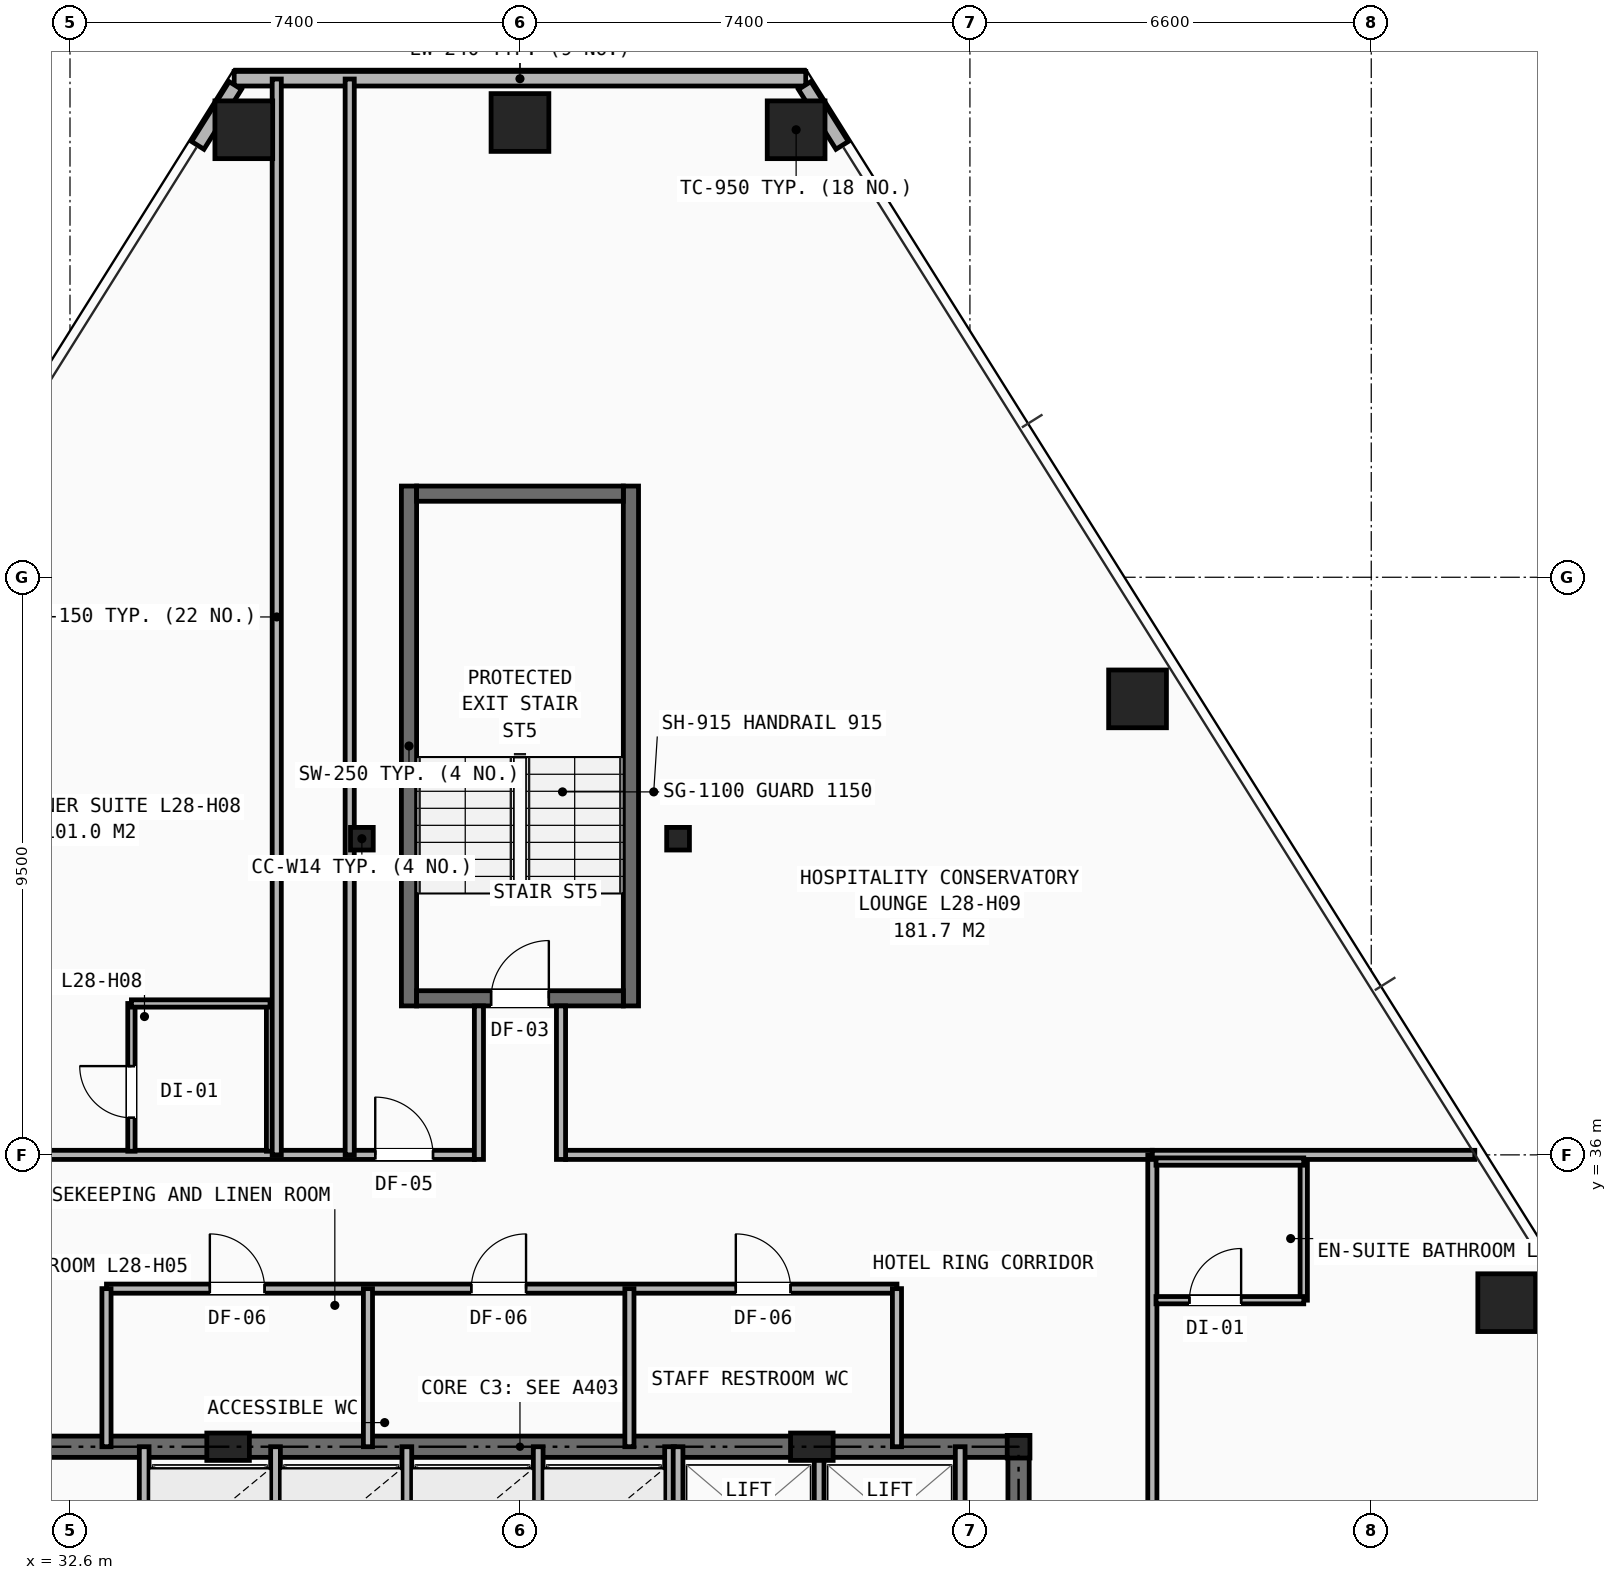
"""IFC4 building model, lengths in metres.
Left out: names, types, materials, properties, quantities, classifications, styles, units other than length and angle.
Written with IfcOpenShell. Run it as: python <this file> out.ifc"""

import sys

from ifc_helpers import new_model, si_unit, direction, frame, frame_2d, origin, origin_2d, place, context, subcontext, project, spatial, rectangle, hollow_rectangle, i_section, extrude, element, fill, save


model = new_model("IFC4")
c1 = context("Model", 3, precision=1e-05, world=origin(), true_north=direction((0.0, 1.0)))
c2 = subcontext(c1, "Body", "Model", "MODEL_VIEW")
j1 = project(units=[si_unit("LENGTHUNIT", "METRE"), si_unit("PLANEANGLEUNIT", "RADIAN")], contexts=[c1])
p1 = place(None, origin())
s1 = spatial("IfcSite", under=j1, at=p1, CompositionType="ELEMENT")
p2 = place(p1, origin())
s2 = spatial("IfcBuilding", under=s1, at=p2, CompositionType="ELEMENT")
p3 = place(p2, frame((0.0, 0.0, 99.0)))
s3 = spatial("IfcBuildingStorey", under=s2, at=p3, CompositionType="ELEMENT", Elevation=99.0)
for number, where, z_axis, x_axis in (
    (1, (48.2, 31.2, 0.0), (0.0, 0.0, 1.0), (1.0, 0.0, 0.0)),
    (2, (37.4, 41.2, 0.0), (0.0, 0.0, 1.0), (1.0, 0.0, 0.0)),
    (3, (42.6, 41.2, 0.0), (0.0, 0.0, 1.0), (1.0, 0.0, 0.0)),
):
    element("IfcColumn", number, at=place(p3, frame(where, z_axis=z_axis, x_axis=x_axis)), inside=s3, PredefinedType="COLUMN", context=c2, shape_type="SweptSolid", body=[
        extrude(i_section(OverallWidth=0.374, OverallDepth=0.372, WebThickness=0.016, FlangeThickness=0.026, at=origin_2d()), origin(), (0.0, 0.0, 1.0), 3.2),
    ])
for number, where, z_axis, x_axis in (
    (4, (35.2, 31.2, 0.0), (0.0, 0.0, 1.0), (1.0, 0.0, 0.0)),
    (5, (44.8, 31.2, 0.0), (0.0, 0.0, 1.0), (1.0, 0.0, 0.0)),
):
    element("IfcColumn", number, at=place(p3, frame(where, z_axis=z_axis, x_axis=x_axis)), inside=s3, PredefinedType="PILASTER", context=c2, shape_type="SweptSolid", body=[
        extrude(rectangle(XDim=0.7, YDim=0.45, at=origin_2d()), origin(), (0.0, 0.0, 1.0), 3.2),
    ])
for number, where, z_axis, x_axis in (
    (6, (44.542, 52.86, 0.0), (0.0, 0.0, 1.0), (1.0, 0.0, 0.0)),
    (7, (40.0, 52.979, 0.0), (0.0, 0.0, 1.0), (1.0, 0.0, 0.0)),
    (8, (35.458, 52.86, 0.0), (0.0, 0.0, 1.0), (1.0, 0.0, 0.0)),
    (9, (56.228, 33.569, 0.0), (0.0, 0.0, 1.0), (1.0, 0.0, 0.0)),
    (10, (50.156, 43.5, 0.0), (0.0, 0.0, 1.0), (1.0, 0.0, 0.0)),
):
    element("IfcColumn", number, at=place(p3, frame(where, z_axis=z_axis, x_axis=x_axis)), inside=s3, PredefinedType="COLUMN", context=c2, shape_type="SweptSolid", body=[
        extrude(hollow_rectangle(XDim=0.95, YDim=0.95, WallThickness=0.065, at=origin_2d()), origin(), (0.0, 0.0, 1.0), 3.2),
    ])
p4 = place(p3, frame((35.3, 53.699, 0.0), z_axis=(0.0, 0.0, 1.0), x_axis=(1.0, 0.0, 0.0)))
e11 = element("IfcWall", 11, at=p4, inside=s3, PredefinedType="SHEAR", context=c2, shape_type="SweptSolid", body=[
    extrude(rectangle(XDim=9.4, YDim=0.24, at=frame_2d((4.7, 0.0))), origin(), (0.0, 0.0, 1.0), 2.253),
])
for number, where, z_axis, x_axis in (
    (12, (35.319, 53.588, 0.0), (0.0, 0.0, 1.0), (-0.531, -0.847, 0.0)),
    (13, (45.299, 52.603, 0.0), (0.0, 0.0, 1.0), (-0.531, 0.847, 0.0)),
):
    element("IfcWall", number, at=place(p3, frame(where, z_axis=z_axis, x_axis=x_axis)), inside=s3, PredefinedType="SHEAR", context=c2, shape_type="SweptSolid", body=[
        extrude(rectangle(XDim=1.162, YDim=0.24, at=frame_2d((0.581, 0.0))), origin(), (0.0, 0.0, 1.0), 2.253),
    ])
p5 = place(p3, frame((31.8, 31.2, 0.0), z_axis=(0.0, 0.0, 1.0), x_axis=(1.0, 0.0, 0.0)))
e14 = element("IfcWall", 14, at=p5, inside=s3, PredefinedType="SHEAR", context=c2, shape_type="SweptSolid", body=[
    extrude(rectangle(XDim=16.4, YDim=0.35, at=frame_2d((8.2, 0.0))), origin(), (0.0, 0.0, 1.0), 2.97),
])
p6 = place(p3, frame((48.2, 16.4, 0.0), z_axis=(0.0, 0.0, 1.0), x_axis=(0.0, 1.0, 0.0)))
e15 = element("IfcWall", 15, at=p6, inside=s3, PredefinedType="SHEAR", context=c2, shape_type="SweptSolid", body=[
    extrude(rectangle(XDim=14.8, YDim=0.35, at=frame_2d((7.4, 0.0))), origin(), (0.0, 0.0, 1.0), 2.97),
])
p7 = place(p6, frame((11.0, 0.0, 0.0)))
e16 = element("IfcOpeningElement", 16, at=p7, cuts=e15, PredefinedType="OPENING", context=c2, shape_type="SweptSolid", body=[
    extrude(rectangle(XDim=1.1, YDim=2.15, at=frame_2d((0.55, 1.075))), frame((0.0, 0.185, 0.0), z_axis=(0.0, -1.0, 0.0), x_axis=(1.0, 0.0, 0.0)), (0.0, 0.0, 1.0), 0.37),
])
for number, where, z_axis, x_axis in (
    (17, (33.82, 29.02, 0.0), (0.0, 0.0, 1.0), (0.0, 1.0, 0.0)),
    (18, (35.98, 29.02, 0.0), (0.0, 0.0, 1.0), (0.0, 1.0, 0.0)),
    (19, (38.14, 29.02, 0.0), (0.0, 0.0, 1.0), (0.0, 1.0, 0.0)),
    (20, (40.3, 29.02, 0.0), (0.0, 0.0, 1.0), (0.0, 1.0, 0.0)),
    (21, (42.46, 29.02, 0.0), (0.0, 0.0, 1.0), (0.0, 1.0, 0.0)),
    (22, (42.6, 29.02, 0.0), (0.0, 0.0, 1.0), (0.0, 1.0, 0.0)),
    (23, (44.92, 29.02, 0.0), (0.0, 0.0, 1.0), (0.0, 1.0, 0.0)),
    (24, (47.24, 29.02, 0.0), (0.0, 0.0, 1.0), (0.0, 1.0, 0.0)),
):
    element("IfcWall", number, at=place(p3, frame(where, z_axis=z_axis, x_axis=x_axis)), inside=s3, PredefinedType="SOLIDWALL", context=c2, shape_type="SweptSolid", body=[
        extrude(rectangle(XDim=2.18, YDim=0.16, at=frame_2d((1.09, 0.0))), origin(), (0.0, 0.0, 1.0), 2.421),
    ])
p8 = place(p3, frame((33.2, 33.8, 0.0), z_axis=(0.0, 0.0, 1.0), x_axis=(1.0, 0.0, 0.0)))
e25 = element("IfcWall", 25, at=p8, inside=s3, PredefinedType="PARTITIONING", context=c2, shape_type="SweptSolid", body=[
    extrude(rectangle(XDim=13.0, YDim=0.15, at=frame_2d((6.5, 0.0))), origin(), (0.0, 0.0, 1.0), 2.97),
])
p9 = place(p8, frame((1.7, 0.0, 0.0)))
e26 = element("IfcOpeningElement", 26, at=p9, cuts=e25, PredefinedType="OPENING", context=c2, shape_type="SweptSolid", body=[
    extrude(rectangle(XDim=0.9, YDim=2.1, at=frame_2d((0.45, 1.05))), frame((0.0, 0.085, 0.0), z_axis=(0.0, -1.0, 0.0), x_axis=(1.0, 0.0, 0.0)), (0.0, 0.0, 1.0), 0.17),
])
p10 = place(p8, frame((6.0, 0.0, 0.0)))
e27 = element("IfcOpeningElement", 27, at=p10, cuts=e25, PredefinedType="OPENING", context=c2, shape_type="SweptSolid", body=[
    extrude(rectangle(XDim=0.9, YDim=2.1, at=frame_2d((0.45, 1.05))), frame((0.0, 0.085, 0.0), z_axis=(0.0, -1.0, 0.0), x_axis=(1.0, 0.0, 0.0)), (0.0, 0.0, 1.0), 0.17),
])
p11 = place(p8, frame((10.35, 0.0, 0.0)))
e28 = element("IfcOpeningElement", 28, at=p11, cuts=e25, PredefinedType="OPENING", context=c2, shape_type="SweptSolid", body=[
    extrude(rectangle(XDim=0.9, YDim=2.1, at=frame_2d((0.45, 1.05))), frame((0.0, 0.085, 0.0), z_axis=(0.0, -1.0, 0.0), x_axis=(1.0, 0.0, 0.0)), (0.0, 0.0, 1.0), 0.17),
])
for number, where, z_axis, x_axis in (
    (29, (33.2, 31.2, 0.0), (0.0, 0.0, 1.0), (0.0, 1.0, 0.0)),
    (30, (46.2, 31.2, 0.0), (0.0, 0.0, 1.0), (0.0, 1.0, 0.0)),
    (31, (37.5, 31.2, 0.0), (0.0, 0.0, 1.0), (0.0, 1.0, 0.0)),
    (32, (41.8, 31.2, 0.0), (0.0, 0.0, 1.0), (0.0, 1.0, 0.0)),
):
    element("IfcWall", number, at=place(p3, frame(where, z_axis=z_axis, x_axis=x_axis)), inside=s3, PredefinedType="PARTITIONING", context=c2, shape_type="SweptSolid", body=[
        extrude(rectangle(XDim=2.6, YDim=0.15, at=frame_2d((1.3, 0.0))), origin(), (0.0, 0.0, 1.0), 2.421),
    ])
p12 = place(p3, frame((29.6, 36.0, 0.0), z_axis=(0.0, 0.0, 1.0), x_axis=(1.0, 0.0, 0.0)))
e33 = element("IfcWall", 33, at=p12, inside=s3, PredefinedType="PARTITIONING", context=c2, shape_type="SweptSolid", body=[
    extrude(rectangle(XDim=9.65, YDim=0.15, at=frame_2d((4.825, 0.0))), origin(), (0.0, 0.0, 1.0), 2.503),
])
p13 = place(p12, frame((0.57, 0.0, 0.0)))
e34 = element("IfcOpeningElement", 34, at=p13, cuts=e33, PredefinedType="OPENING", context=c2, shape_type="SweptSolid", body=[
    extrude(rectangle(XDim=0.95, YDim=2.1, at=frame_2d((0.475, 1.05))), frame((0.0, 0.085, 0.0), z_axis=(0.0, -1.0, 0.0), x_axis=(1.0, 0.0, 0.0)), (0.0, 0.0, 1.0), 0.17),
])
p14 = place(p12, frame((8.02, 0.0, 0.0)))
e35 = element("IfcOpeningElement", 35, at=p14, cuts=e33, PredefinedType="OPENING", context=c2, shape_type="SweptSolid", body=[
    extrude(rectangle(XDim=0.95, YDim=2.1, at=frame_2d((0.475, 1.05))), frame((0.0, 0.085, 0.0), z_axis=(0.0, -1.0, 0.0), x_axis=(1.0, 0.0, 0.0)), (0.0, 0.0, 1.0), 0.17),
])
p15 = place(p3, frame((40.75, 36.0, 0.0), z_axis=(0.0, 0.0, 1.0), x_axis=(1.0, 0.0, 0.0)))
e36 = element("IfcWall", 36, at=p15, inside=s3, PredefinedType="PARTITIONING", context=c2, shape_type="SweptSolid", body=[
    extrude(rectangle(XDim=9.65, YDim=0.15, at=frame_2d((4.825, 0.0))), origin(), (0.0, 0.0, 1.0), 2.503),
])
p16 = place(p3, frame((50.4, 14.1, 0.0), z_axis=(0.0, 0.0, 1.0), x_axis=(0.0, 1.0, 0.0)))
e37 = element("IfcWall", 37, at=p16, inside=s3, PredefinedType="PARTITIONING", context=c2, shape_type="SweptSolid", body=[
    extrude(rectangle(XDim=21.9, YDim=0.15, at=frame_2d((10.95, 0.0))), origin(), (0.0, 0.0, 1.0), 2.181),
])
p17 = place(p16, frame((0.42, 0.0, 0.0)))
e38 = element("IfcOpeningElement", 38, at=p17, cuts=e37, PredefinedType="OPENING", context=c2, shape_type="SweptSolid", body=[
    extrude(rectangle(XDim=0.95, YDim=2.1, at=frame_2d((0.475, 1.05))), frame((0.0, 0.085, 0.0), z_axis=(0.0, -1.0, 0.0), x_axis=(1.0, 0.0, 0.0)), (0.0, 0.0, 1.0), 0.17),
])
p18 = place(p16, frame((10.82, 0.0, 0.0)))
e39 = element("IfcOpeningElement", 39, at=p18, cuts=e37, PredefinedType="OPENING", context=c2, shape_type="SweptSolid", body=[
    extrude(rectangle(XDim=0.95, YDim=2.1, at=frame_2d((0.475, 1.05))), frame((0.0, 0.085, 0.0), z_axis=(0.0, -1.0, 0.0), x_axis=(1.0, 0.0, 0.0)), (0.0, 0.0, 1.0), 0.17),
])
p19 = place(p3, frame((50.4, 36.0, 0.0), z_axis=(0.0, 0.0, 1.0), x_axis=(1.0, 0.0, 0.0)))
e40 = element("IfcWall", 40, at=p19, inside=s3, PredefinedType="PARTITIONING", context=c2, shape_type="SweptSolid", body=[
    extrude(rectangle(XDim=5.303, YDim=0.15, at=frame_2d((2.651, 0.0))), origin(), (0.0, 0.0, 1.0), 2.258),
])
p20 = place(p3, frame((52.89, 33.61, 0.0), z_axis=(0.0, 0.0, 1.0), x_axis=(0.0, 1.0, 0.0)))
e41 = element("IfcWall", 41, at=p20, inside=s3, PredefinedType="PARTITIONING", context=c2, shape_type="SweptSolid", body=[
    extrude(rectangle(XDim=2.28, YDim=0.12, at=frame_2d((1.14, 0.0))), origin(), (0.0, 0.0, 1.0), 2.97),
])
p21 = place(p3, frame((50.46, 33.61, 0.0), z_axis=(0.0, 0.0, 1.0), x_axis=(1.0, 0.0, 0.0)))
e42 = element("IfcWall", 42, at=p21, inside=s3, PredefinedType="PARTITIONING", context=c2, shape_type="SweptSolid", body=[
    extrude(rectangle(XDim=2.43, YDim=0.12, at=frame_2d((1.215, 0.0))), origin(), (0.0, 0.0, 1.0), 2.503),
])
p22 = place(p21, frame((0.55, 0.0, 0.0)))
e43 = element("IfcOpeningElement", 43, at=p22, cuts=e42, PredefinedType="OPENING", context=c2, shape_type="SweptSolid", body=[
    extrude(rectangle(XDim=0.85, YDim=2.05, at=frame_2d((0.425, 1.025))), frame((0.0, 0.07, 0.0), z_axis=(0.0, -1.0, 0.0), x_axis=(1.0, 0.0, 0.0)), (0.0, 0.0, 1.0), 0.14),
])
p23 = place(p3, frame((50.46, 35.89, 0.0), z_axis=(0.0, 0.0, 1.0), x_axis=(1.0, 0.0, 0.0)))
e44 = element("IfcWall", 44, at=p23, inside=s3, PredefinedType="PARTITIONING", context=c2, shape_type="SweptSolid", body=[
    extrude(rectangle(XDim=2.43, YDim=0.12, at=frame_2d((1.215, 0.0))), origin(), (0.0, 0.0, 1.0), 2.97),
])
p24 = place(p3, frame((33.61, 36.06, 0.0), z_axis=(0.0, 0.0, 1.0), x_axis=(0.0, 1.0, 0.0)))
e45 = element("IfcWall", 45, at=p24, inside=s3, PredefinedType="PARTITIONING", context=c2, shape_type="SweptSolid", body=[
    extrude(rectangle(XDim=2.43, YDim=0.12, at=frame_2d((1.215, 0.0))), origin(), (0.0, 0.0, 1.0), 2.97),
])
p25 = place(p24, frame((0.55, 0.0, 0.0)))
e46 = element("IfcOpeningElement", 46, at=p25, cuts=e45, PredefinedType="OPENING", context=c2, shape_type="SweptSolid", body=[
    extrude(rectangle(XDim=0.85, YDim=2.05, at=frame_2d((0.425, 1.025))), frame((0.0, 0.07, 0.0), z_axis=(0.0, -1.0, 0.0), x_axis=(1.0, 0.0, 0.0)), (0.0, 0.0, 1.0), 0.14),
])
p26 = place(p3, frame((35.89, 36.06, 0.0), z_axis=(0.0, 0.0, 1.0), x_axis=(0.0, 1.0, 0.0)))
e47 = element("IfcWall", 47, at=p26, inside=s3, PredefinedType="PARTITIONING", context=c2, shape_type="SweptSolid", body=[
    extrude(rectangle(XDim=2.43, YDim=0.12, at=frame_2d((1.215, 0.0))), origin(), (0.0, 0.0, 1.0), 2.97),
])
p27 = place(p3, frame((33.61, 38.49, 0.0), z_axis=(0.0, 0.0, 1.0), x_axis=(1.0, 0.0, 0.0)))
e48 = element("IfcWall", 48, at=p27, inside=s3, PredefinedType="PARTITIONING", context=c2, shape_type="SweptSolid", body=[
    extrude(rectangle(XDim=2.28, YDim=0.12, at=frame_2d((1.14, 0.0))), origin(), (0.0, 0.0, 1.0), 2.97),
])
for number, where, z_axis, x_axis in (
    (49, (36.0, 36.0, 0.0), (0.0, 0.0, 1.0), (0.0, 1.0, 0.0)),
    (50, (37.2, 36.0, 0.0), (0.0, 0.0, 1.0), (0.0, 1.0, 0.0)),
):
    element("IfcWall", number, at=place(p3, frame(where, z_axis=z_axis, x_axis=x_axis)), inside=s3, PredefinedType="PARTITIONING", context=c2, shape_type="SweptSolid", body=[
        extrude(rectangle(XDim=17.694, YDim=0.15, at=frame_2d((8.847, 0.0))), origin(), (0.0, 0.0, 1.0), 2.181),
    ])
for number, where, z_axis, x_axis in (
    (51, (38.175, 38.45, 0.0), (0.0, 0.0, 1.0), (0.0, 1.0, 0.0)),
    (52, (41.825, 38.45, 0.0), (0.0, 0.0, 1.0), (0.0, 1.0, 0.0)),
):
    element("IfcWall", number, at=place(p3, frame(where, z_axis=z_axis, x_axis=x_axis)), inside=s3, PredefinedType="SHEAR", context=c2, shape_type="SweptSolid", body=[
        extrude(rectangle(XDim=8.55, YDim=0.25, at=frame_2d((4.275, 0.0))), origin(), (0.0, 0.0, 1.0), 2.97),
    ])
p28 = place(p3, frame((38.3, 38.575, 0.0), z_axis=(0.0, 0.0, 1.0), x_axis=(1.0, 0.0, 0.0)))
e53 = element("IfcWall", 53, at=p28, inside=s3, PredefinedType="SHEAR", context=c2, shape_type="SweptSolid", body=[
    extrude(rectangle(XDim=3.4, YDim=0.25, at=frame_2d((1.7, 0.0))), origin(), (0.0, 0.0, 1.0), 2.97),
])
p29 = place(p28, frame((1.225, 0.0, 0.0)))
e54 = element("IfcOpeningElement", 54, at=p29, cuts=e53, PredefinedType="OPENING", context=c2, shape_type="SweptSolid", body=[
    extrude(rectangle(XDim=0.95, YDim=2.1, at=frame_2d((0.475, 1.05))), frame((0.0, 0.135, 0.0), z_axis=(0.0, -1.0, 0.0), x_axis=(1.0, 0.0, 0.0)), (0.0, 0.0, 1.0), 0.27),
])
p30 = place(p3, frame((38.3, 46.875, 0.0), z_axis=(0.0, 0.0, 1.0), x_axis=(1.0, 0.0, 0.0)))
e55 = element("IfcWall", 55, at=p30, inside=s3, PredefinedType="SHEAR", context=c2, shape_type="SweptSolid", body=[
    extrude(rectangle(XDim=3.4, YDim=0.25, at=frame_2d((1.7, 0.0))), origin(), (0.0, 0.0, 1.0), 2.97),
])
for number, where, z_axis, x_axis in (
    (56, (39.325, 35.925, 0.0), (0.0, 0.0, 1.0), (0.0, 1.0, 0.0)),
    (57, (40.675, 35.925, 0.0), (0.0, 0.0, 1.0), (0.0, 1.0, 0.0)),
):
    element("IfcWall", number, at=place(p3, frame(where, z_axis=z_axis, x_axis=x_axis)), inside=s3, PredefinedType="PARTITIONING", context=c2, shape_type="SweptSolid", body=[
        extrude(rectangle(XDim=2.525, YDim=0.15, at=frame_2d((1.262, 0.0))), origin(), (0.0, 0.0, 1.0), 2.97),
    ])
p31 = place(p9, origin())
e58 = element("IfcDoor", 58, at=p31, inside=s3, OperationType="SINGLE_SWING_LEFT", PredefinedType="DOOR", context=c2, shape_type="SweptSolid", body=[
    extrude(rectangle(XDim=0.9, YDim=2.1, at=frame_2d((0.45, 1.05))), frame((0.0, 0.025, 0.0), z_axis=(0.0, -1.0, 0.0), x_axis=(1.0, 0.0, 0.0)), (0.0, 0.0, 1.0), 0.05),
])
fill(e26, e58)
p32 = place(p10, origin())
e59 = element("IfcDoor", 59, at=p32, inside=s3, OperationType="SINGLE_SWING_RIGHT", PredefinedType="DOOR", context=c2, shape_type="SweptSolid", body=[
    extrude(rectangle(XDim=0.9, YDim=2.1, at=frame_2d((0.45, 1.05))), frame((0.0, 0.025, 0.0), z_axis=(0.0, -1.0, 0.0), x_axis=(1.0, 0.0, 0.0)), (0.0, 0.0, 1.0), 0.05),
])
fill(e27, e59)
p33 = place(p11, origin())
e60 = element("IfcDoor", 60, at=p33, inside=s3, OperationType="SINGLE_SWING_LEFT", PredefinedType="DOOR", context=c2, shape_type="SweptSolid", body=[
    extrude(rectangle(XDim=0.9, YDim=2.1, at=frame_2d((0.45, 1.05))), frame((0.0, 0.025, 0.0), z_axis=(0.0, -1.0, 0.0), x_axis=(1.0, 0.0, 0.0)), (0.0, 0.0, 1.0), 0.05),
])
fill(e28, e60)
p34 = place(p22, origin())
e61 = element("IfcDoor", 61, at=p34, inside=s3, OperationType="SINGLE_SWING_RIGHT", PredefinedType="DOOR", context=c2, shape_type="SweptSolid", body=[
    extrude(rectangle(XDim=0.85, YDim=2.05, at=frame_2d((0.425, 1.025))), frame((0.0, 0.025, 0.0), z_axis=(0.0, -1.0, 0.0), x_axis=(1.0, 0.0, 0.0)), (0.0, 0.0, 1.0), 0.05),
])
fill(e43, e61)
p35 = place(p25, origin())
e62 = element("IfcDoor", 62, at=p35, inside=s3, OperationType="SINGLE_SWING_RIGHT", PredefinedType="DOOR", context=c2, shape_type="SweptSolid", body=[
    extrude(rectangle(XDim=0.85, YDim=2.05, at=frame_2d((0.425, 1.025))), frame((0.0, 0.025, 0.0), z_axis=(0.0, -1.0, 0.0), x_axis=(1.0, 0.0, 0.0)), (0.0, 0.0, 1.0), 0.05),
])
fill(e46, e62)
p36 = place(p14, origin())
e63 = element("IfcDoor", 63, at=p36, inside=s3, OperationType="SINGLE_SWING_LEFT", PredefinedType="DOOR", context=c2, shape_type="SweptSolid", body=[
    extrude(rectangle(XDim=0.95, YDim=2.1, at=frame_2d((0.475, 1.05))), frame((0.0, 0.025, 0.0), z_axis=(0.0, -1.0, 0.0), x_axis=(1.0, 0.0, 0.0)), (0.0, 0.0, 1.0), 0.05),
])
fill(e35, e63)
p37 = place(p29, origin())
e64 = element("IfcDoor", 64, at=p37, inside=s3, OperationType="SINGLE_SWING_RIGHT", PredefinedType="DOOR", context=c2, shape_type="SweptSolid", body=[
    extrude(rectangle(XDim=0.95, YDim=2.1, at=frame_2d((0.475, 1.05))), frame((0.0, 0.025, 0.0), z_axis=(0.0, -1.0, 0.0), x_axis=(1.0, 0.0, 0.0)), (0.0, 0.0, 1.0), 0.05),
])
fill(e54, e64)
save(model, sys.argv[1])
